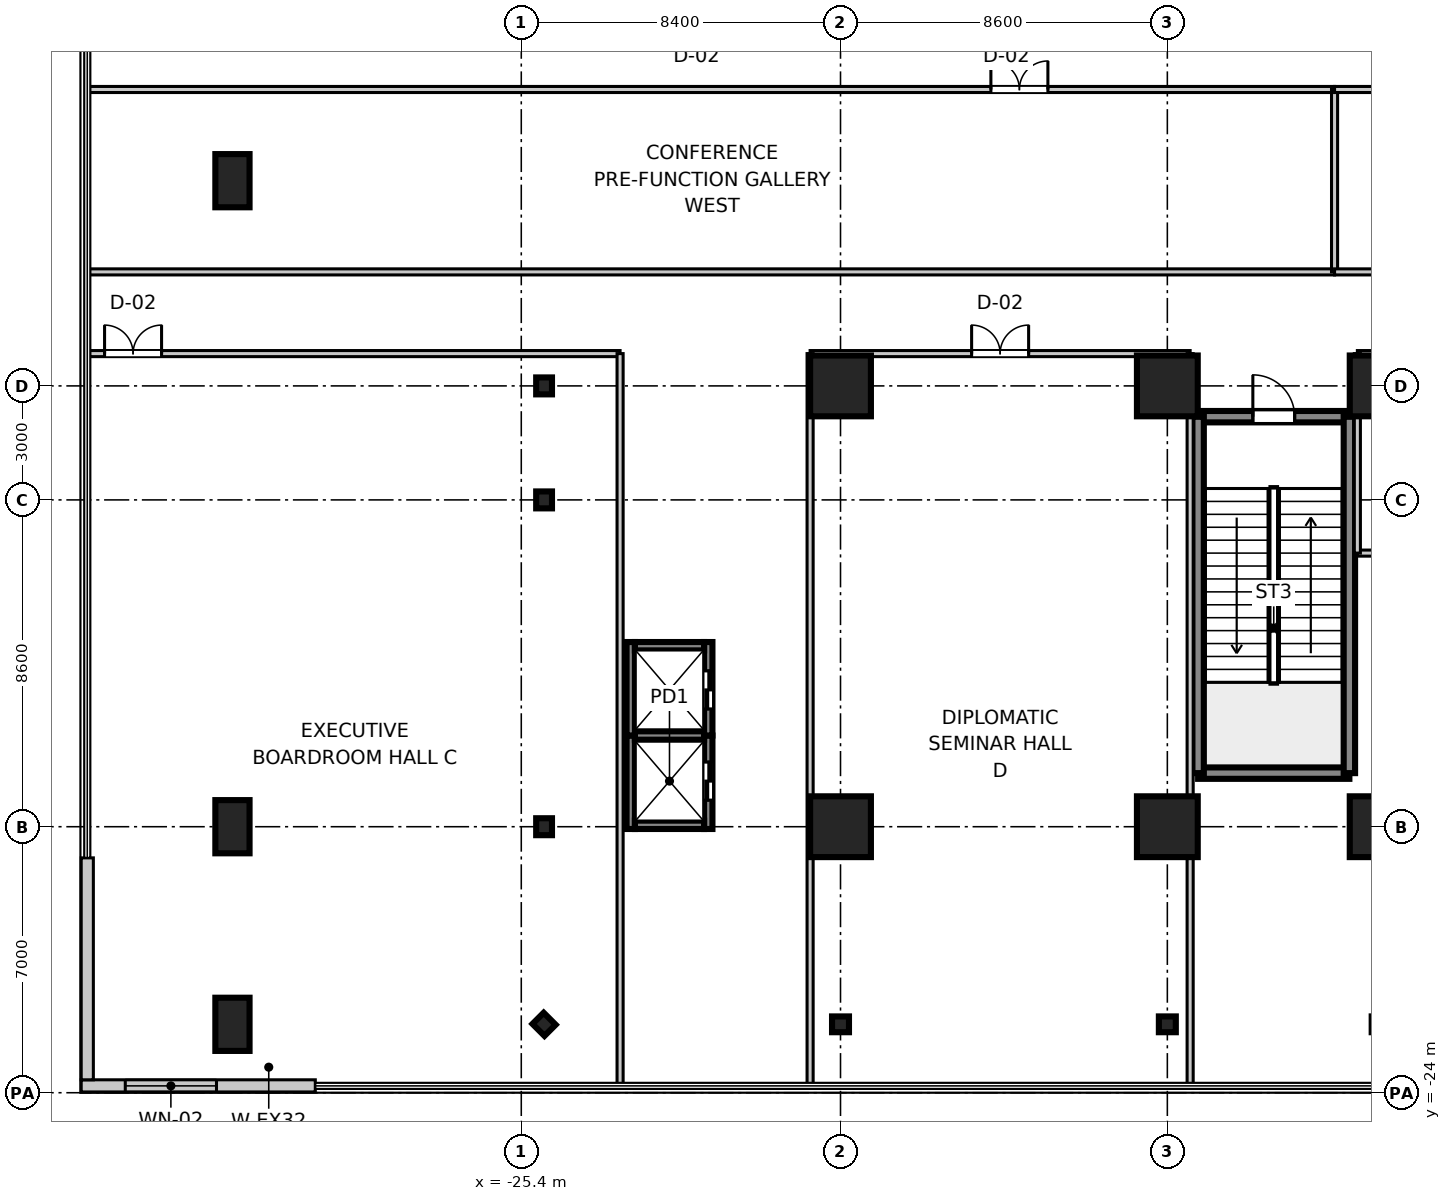
"""IFC4 building model, lengths in metres.
Left out: names, types, materials, properties, quantities, classifications, styles, units other than length and angle.
Written with IfcOpenShell. Run it as: python <this file> out.ifc"""

import sys

from ifc_helpers import new_model, si_unit, direction, frame, frame_2d, origin, origin_2d, place, context, subcontext, project, spatial, rectangle, i_section, extrude, source, transform, mapped, element, fill, save


model = new_model("IFC4")
c1 = context("Model", 3, precision=1e-05, world=origin(), true_north=direction((0.0, 1.0)))
c2 = subcontext(c1, "Body", "Model", "MODEL_VIEW")
j1 = project(units=[si_unit("LENGTHUNIT", "METRE"), si_unit("PLANEANGLEUNIT", "RADIAN")], contexts=[c1])
p1 = place(None, origin())
s1 = spatial("IfcSite", under=j1, at=p1, CompositionType="ELEMENT")
p2 = place(p1, origin())
s2 = spatial("IfcBuilding", under=s1, at=p2, CompositionType="ELEMENT")
p3 = place(p2, frame((0.0, 0.0, 10.8)))
s3 = spatial("IfcBuildingStorey", under=s2, at=p3, CompositionType="ELEMENT", Elevation=10.8)
m1 = source(origin(), c2, "Body", "SweptSolid", [
    extrude(rectangle(XDim=1.6, YDim=1.6, at=origin_2d()), origin(), (0.0, 0.0, 1.0), 5.355),
])
for number, where, z_axis, x_axis in (
    (1, (-17.0, -17.0, 0.0), (0.0, 0.0, 1.0), (1.0, 0.0, 0.0)),
    (2, (-17.0, -5.4, 0.0), (0.0, 0.0, 1.0), (1.0, 0.0, 0.0)),
    (3, (-8.4, -17.0, 0.0), (0.0, 0.0, 1.0), (1.0, 0.0, 0.0)),
    (4, (-8.4, -5.4, 0.0), (0.0, 0.0, 1.0), (1.0, 0.0, 0.0)),
    (5, (-2.8, -17.0, 0.0), (0.0, 0.0, 1.0), (1.0, 0.0, 0.0)),
    (6, (-2.8, -5.4, 0.0), (0.0, 0.0, 1.0), (1.0, 0.0, 0.0)),
):
    element("IfcColumn", number, at=place(p3, frame(where, z_axis=z_axis, x_axis=x_axis)), inside=s3, PredefinedType="COLUMN", context=c2, shape_type="MappedRepresentation", body=[
        mapped(m1, transform((0.0, 0.0, 0.0), scale=1.0)),
    ])
m2 = source(origin(), c2, "Body", "SweptSolid", [
    extrude(rectangle(XDim=0.9, YDim=1.4, at=origin_2d()), origin(), (0.0, 0.0, 1.0), 5.355),
])
for number, where, z_axis, x_axis in (
    (7, (-33.0, -22.2, 0.0), (0.0, 0.0, 1.0), (1.0, 0.0, 0.0)),
    (8, (-33.0, -17.0, 0.0), (0.0, 0.0, 1.0), (1.0, 0.0, 0.0)),
    (9, (-33.0, 0.0, 0.0), (0.0, 0.0, 1.0), (1.0, 0.0, 0.0)),
):
    element("IfcColumn", number, at=place(p3, frame(where, z_axis=z_axis, x_axis=x_axis)), inside=s3, PredefinedType="PILASTER", context=c2, shape_type="MappedRepresentation", body=[
        mapped(m2, transform((0.0, 0.0, 0.0), scale=1.0)),
    ])
m3 = source(origin(), c2, "Body", "SweptSolid", [
    extrude(i_section(OverallWidth=0.416, OverallDepth=0.446, WebThickness=0.025, FlangeThickness=0.04, at=origin_2d()), origin(), (0.0, 0.0, 1.0), 5.355),
])
for number, where, z_axis, x_axis in (
    (10, (-24.8, -17.0, 0.0), (0.0, 0.0, 1.0), (1.0, 0.0, 0.0)),
    (11, (-24.8, -8.4, 0.0), (0.0, 0.0, 1.0), (1.0, 0.0, 0.0)),
    (12, (-24.8, -5.4, 0.0), (0.0, 0.0, 1.0), (1.0, 0.0, 0.0)),
    (13, (-17.0, -22.2, 0.0), (0.0, 0.0, 1.0), (0.0, 1.0, 0.0)),
    (14, (-8.4, -22.2, 0.0), (0.0, 0.0, 1.0), (0.0, 1.0, 0.0)),
    (15, (-2.8, -22.2, 0.0), (0.0, 0.0, 1.0), (0.0, 1.0, 0.0)),
    (16, (-24.8, -22.2, 0.0), (0.0, 0.0, 1.0), (0.707, 0.707, 0.0)),
):
    element("IfcColumn", number, at=place(p3, frame(where, z_axis=z_axis, x_axis=x_axis)), inside=s3, PredefinedType="COLUMN", context=c2, shape_type="MappedRepresentation", body=[
        mapped(m3, transform((0.0, 0.0, 0.0), scale=1.0)),
    ])
m4 = source(origin(), c2, "Body", "SweptSolid", [
    extrude(rectangle(XDim=3.98, YDim=0.3, at=frame_2d((1.99, 0.0))), origin(), (0.0, 0.0, 1.0), 5.06),
])
p4 = place(p3, frame((-7.59, -15.59, 0.0), z_axis=(0.0, 0.0, 1.0), x_axis=(1.0, 0.0, 0.0)))
e17 = element("IfcWall", 17, at=p4, inside=s3, PredefinedType="SHEAR", context=c2, shape_type="MappedRepresentation", body=[
    mapped(m4, transform((0.0, 0.0, 0.0), scale=1.0)),
])
p5 = place(p3, frame((-7.59, -6.21, 0.0), z_axis=(0.0, 0.0, 1.0), x_axis=(1.0, 0.0, 0.0)))
e18 = element("IfcWall", 18, at=p5, inside=s3, PredefinedType="SHEAR", context=c2, shape_type="MappedRepresentation", body=[
    mapped(m4, transform((0.0, 0.0, 0.0), scale=1.0)),
])
p6 = place(p5, frame((1.44, 0.0, 0.0)))
e19 = element("IfcOpeningElement", 19, at=p6, cuts=e18, PredefinedType="OPENING", context=c2, shape_type="SweptSolid", body=[
    extrude(rectangle(XDim=1.1, YDim=2.15, at=frame_2d((0.55, 1.075))), frame((0.0, 0.16, 0.0), z_axis=(0.0, -1.0, 0.0), x_axis=(1.0, 0.0, 0.0)), (0.0, 0.0, 1.0), 0.32),
])
m5 = source(origin(), c2, "Body", "SweptSolid", [
    extrude(rectangle(XDim=9.38, YDim=0.3, at=frame_2d((4.69, 0.0))), origin(), (0.0, 0.0, 1.0), 5.06),
])
for number, where, z_axis, x_axis in (
    (20, (-7.59, -15.59, 0.0), (0.0, 0.0, 1.0), (0.0, 1.0, 0.0)),
    (21, (-3.61, -15.59, 0.0), (0.0, 0.0, 1.0), (0.0, 1.0, 0.0)),
):
    element("IfcWall", number, at=place(p3, frame(where, z_axis=z_axis, x_axis=x_axis)), inside=s3, PredefinedType="SHEAR", context=c2, shape_type="MappedRepresentation", body=[
        mapped(m5, transform((0.0, 0.0, 0.0), scale=1.0)),
    ])
m6 = source(origin(), c2, "Body", "SweptSolid", [
    extrude(rectangle(XDim=2.46, YDim=0.22, at=frame_2d((1.23, 0.0))), origin(), (0.0, 0.0, 1.0), 5.06),
])
p7 = place(p3, frame((-22.52, -17.06, 0.0), z_axis=(0.0, 0.0, 1.0), x_axis=(0.0, 1.0, 0.0)))
e22 = element("IfcWall", 22, at=p7, inside=s3, PredefinedType="SHEAR", context=c2, shape_type="MappedRepresentation", body=[
    mapped(m6, transform((0.0, 0.0, 0.0), scale=1.0)),
])
p8 = place(p3, frame((-20.48, -17.06, 0.0), z_axis=(0.0, 0.0, 1.0), x_axis=(0.0, 1.0, 0.0)))
e23 = element("IfcWall", 23, at=p8, inside=s3, PredefinedType="SHEAR", context=c2, shape_type="MappedRepresentation", body=[
    mapped(m6, transform((0.0, 0.0, 0.0), scale=1.0)),
])
p9 = place(p8, frame((0.76, 0.0, 0.0)))
e24 = element("IfcOpeningElement", 24, at=p9, cuts=e23, PredefinedType="OPENING", context=c2, shape_type="SweptSolid", body=[
    extrude(rectangle(XDim=1.0, YDim=2.2, at=frame_2d((0.5, 1.1))), frame((0.0, 0.12, 0.0), z_axis=(0.0, -1.0, 0.0), x_axis=(1.0, 0.0, 0.0)), (0.0, 0.0, 1.0), 0.24),
])
m7 = source(origin(), c2, "Body", "SweptSolid", [
    extrude(rectangle(XDim=1.82, YDim=0.22, at=frame_2d((0.91, 0.0))), origin(), (0.0, 0.0, 1.0), 5.06),
])
p10 = place(p3, frame((-22.41, -16.95, 0.0), z_axis=(0.0, 0.0, 1.0), x_axis=(1.0, 0.0, 0.0)))
e25 = element("IfcWall", 25, at=p10, inside=s3, PredefinedType="SHEAR", context=c2, shape_type="MappedRepresentation", body=[
    mapped(m7, transform((0.0, 0.0, 0.0), scale=1.0)),
])
m8 = source(origin(), c2, "Body", "SweptSolid", [
    extrude(rectangle(XDim=1.82, YDim=0.22, at=frame_2d((0.91, 0.0))), origin(), (0.0, 0.0, 1.0), 5.4),
])
p11 = place(p3, frame((-22.41, -14.6, 0.0), z_axis=(0.0, 0.0, 1.0), x_axis=(1.0, 0.0, 0.0)))
e26 = element("IfcWall", 26, at=p11, inside=s3, PredefinedType="SHEAR", context=c2, shape_type="MappedRepresentation", body=[
    mapped(m8, transform((0.0, 0.0, 0.0), scale=1.0)),
])
m9 = source(origin(), c2, "Body", "SweptSolid", [
    extrude(rectangle(XDim=2.46, YDim=0.22, at=frame_2d((1.23, 0.0))), origin(), (0.0, 0.0, 1.0), 5.06),
])
p12 = place(p3, frame((-22.52, -14.6, 0.0), z_axis=(0.0, 0.0, 1.0), x_axis=(0.0, 1.0, 0.0)))
e27 = element("IfcWall", 27, at=p12, inside=s3, PredefinedType="SHEAR", context=c2, shape_type="MappedRepresentation", body=[
    mapped(m9, transform((0.0, 0.0, 0.0), scale=1.0)),
])
p13 = place(p3, frame((-20.48, -14.6, 0.0), z_axis=(0.0, 0.0, 1.0), x_axis=(0.0, 1.0, 0.0)))
e28 = element("IfcWall", 28, at=p13, inside=s3, PredefinedType="SHEAR", context=c2, shape_type="MappedRepresentation", body=[
    mapped(m9, transform((0.0, 0.0, 0.0), scale=1.0)),
])
p14 = place(p13, frame((0.7, 0.0, 0.0)))
e29 = element("IfcOpeningElement", 29, at=p14, cuts=e28, PredefinedType="OPENING", context=c2, shape_type="SweptSolid", body=[
    extrude(rectangle(XDim=1.0, YDim=2.2, at=frame_2d((0.5, 1.1))), frame((0.0, 0.12, 0.0), z_axis=(0.0, -1.0, 0.0), x_axis=(1.0, 0.0, 0.0)), (0.0, 0.0, 1.0), 0.24),
])
p15 = place(p3, frame((-22.41, -12.25, 0.0), z_axis=(0.0, 0.0, 1.0), x_axis=(1.0, 0.0, 0.0)))
e30 = element("IfcWall", 30, at=p15, inside=s3, PredefinedType="SHEAR", context=c2, shape_type="MappedRepresentation", body=[
    mapped(m7, transform((0.0, 0.0, 0.0), scale=1.0)),
])
m10 = source(origin(), c2, "Body", "SweptSolid", [
    extrude(rectangle(XDim=6.16, YDim=0.32, at=frame_2d((3.08, 0.0))), origin(), (0.0, 0.0, 1.0), 5.06),
])
p16 = place(p3, frame((-36.98, -23.82, 0.0), z_axis=(0.0, 0.0, 1.0), x_axis=(1.0, 0.0, 0.0)))
e31 = element("IfcWall", 31, at=p16, inside=s3, PredefinedType="STANDARD", context=c2, shape_type="MappedRepresentation", body=[
    mapped(m10, transform((0.0, 0.0, 0.0), scale=1.0)),
])
p17 = place(p16, frame((1.16, 0.0, 0.9)))
e32 = element("IfcOpeningElement", 32, at=p17, cuts=e31, PredefinedType="OPENING", context=c2, shape_type="SweptSolid", body=[
    extrude(rectangle(XDim=2.4, YDim=2.2, at=frame_2d((1.2, 1.1))), frame((0.0, 0.17, 0.0), z_axis=(0.0, -1.0, 0.0), x_axis=(1.0, 0.0, 0.0)), (0.0, 0.0, 1.0), 0.34),
])
m11 = source(origin(), c2, "Body", "SweptSolid", [
    extrude(rectangle(XDim=5.84, YDim=0.32, at=frame_2d((2.92, 0.0))), origin(), (0.0, 0.0, 1.0), 5.06),
])
p18 = place(p3, frame((-36.82, -23.66, 0.0), z_axis=(0.0, 0.0, 1.0), x_axis=(0.0, 1.0, 0.0)))
e33 = element("IfcWall", 33, at=p18, inside=s3, PredefinedType="STANDARD", context=c2, shape_type="MappedRepresentation", body=[
    mapped(m11, transform((0.0, 0.0, 0.0), scale=1.0)),
])
m12 = source(origin(), c2, "Body", "SweptSolid", [
    extrude(rectangle(XDim=13.96, YDim=0.16, at=frame_2d((6.98, 0.0))), origin(), (0.0, 0.0, 1.0), 3.4),
])
p19 = place(p3, frame((-36.76, -4.55, 0.0), z_axis=(0.0, 0.0, 1.0), x_axis=(1.0, 0.0, 0.0)))
e34 = element("IfcWall", 34, at=p19, inside=s3, PredefinedType="PARTITIONING", context=c2, shape_type="MappedRepresentation", body=[
    mapped(m12, transform((0.0, 0.0, 0.0), scale=1.0)),
])
p20 = place(p19, frame((0.395, 0.0, 0.0)))
e35 = element("IfcOpeningElement", 35, at=p20, cuts=e34, PredefinedType="OPENING", context=c2, shape_type="SweptSolid", body=[
    extrude(rectangle(XDim=1.5, YDim=2.15, at=frame_2d((0.75, 1.075))), frame((0.0, 0.09, 0.0), z_axis=(0.0, -1.0, 0.0), x_axis=(1.0, 0.0, 0.0)), (0.0, 0.0, 1.0), 0.18),
])
m13 = source(origin(), c2, "Body", "SweptSolid", [
    extrude(rectangle(XDim=19.21, YDim=0.16, at=frame_2d((9.605, 0.0))), origin(), (0.0, 0.0, 1.0), 3.4),
])
p21 = place(p3, frame((-22.8, -23.76, 0.0), z_axis=(0.0, 0.0, 1.0), x_axis=(0.0, 1.0, 0.0)))
e36 = element("IfcWall", 36, at=p21, inside=s3, PredefinedType="PARTITIONING", context=c2, shape_type="MappedRepresentation", body=[
    mapped(m13, transform((0.0, 0.0, 0.0), scale=1.0)),
])
m14 = source(origin(), c2, "Body", "SweptSolid", [
    extrude(rectangle(XDim=10.0, YDim=0.16, at=frame_2d((5.0, 0.0))), origin(), (0.0, 0.0, 1.0), 3.4),
])
p22 = place(p3, frame((-17.8, -4.55, 0.0), z_axis=(0.0, 0.0, 1.0), x_axis=(1.0, 0.0, 0.0)))
e37 = element("IfcWall", 37, at=p22, inside=s3, PredefinedType="PARTITIONING", context=c2, shape_type="MappedRepresentation", body=[
    mapped(m14, transform((0.0, 0.0, 0.0), scale=1.0)),
])
p23 = place(p22, frame((4.25, 0.0, 0.0)))
e38 = element("IfcOpeningElement", 38, at=p23, cuts=e37, PredefinedType="OPENING", context=c2, shape_type="SweptSolid", body=[
    extrude(rectangle(XDim=1.5, YDim=2.15, at=frame_2d((0.75, 1.075))), frame((0.0, 0.09, 0.0), z_axis=(0.0, -1.0, 0.0), x_axis=(1.0, 0.0, 0.0)), (0.0, 0.0, 1.0), 0.18),
])
for number, where, z_axis, x_axis in (
    (39, (-17.8, -23.76, 0.0), (0.0, 0.0, 1.0), (0.0, 1.0, 0.0)),
    (40, (-7.8, -23.76, 0.0), (0.0, 0.0, 1.0), (0.0, 1.0, 0.0)),
):
    element("IfcWall", number, at=place(p3, frame(where, z_axis=z_axis, x_axis=x_axis)), inside=s3, PredefinedType="PARTITIONING", context=c2, shape_type="MappedRepresentation", body=[
        mapped(m13, transform((0.0, 0.0, 0.0), scale=1.0)),
    ])
m15 = source(origin(), c2, "Body", "SweptSolid", [
    extrude(rectangle(XDim=32.76, YDim=0.16, at=frame_2d((16.38, 0.0))), origin(), (0.0, 0.0, 1.0), 3.4),
])
p24 = place(p3, frame((-36.76, -2.4, 0.0), z_axis=(0.0, 0.0, 1.0), x_axis=(1.0, 0.0, 0.0)))
e41 = element("IfcWall", 41, at=p24, inside=s3, PredefinedType="PARTITIONING", context=c2, shape_type="MappedRepresentation", body=[
    mapped(m15, transform((0.0, 0.0, 0.0), scale=1.0)),
])
p25 = place(p3, frame((-36.76, 2.4, 0.0), z_axis=(0.0, 0.0, 1.0), x_axis=(1.0, 0.0, 0.0)))
e42 = element("IfcWall", 42, at=p25, inside=s3, PredefinedType="PARTITIONING", context=c2, shape_type="MappedRepresentation", body=[
    mapped(m15, transform((0.0, 0.0, 0.0), scale=1.0)),
])
p26 = place(p25, frame((23.717, 0.0, 0.0)))
e43 = element("IfcOpeningElement", 43, at=p26, cuts=e42, PredefinedType="OPENING", context=c2, shape_type="SweptSolid", body=[
    extrude(rectangle(XDim=1.5, YDim=2.15, at=frame_2d((0.75, 1.075))), frame((0.0, 0.09, 0.0), z_axis=(0.0, -1.0, 0.0), x_axis=(1.0, 0.0, 0.0)), (0.0, 0.0, 1.0), 0.18),
])
m16 = source(origin(), c2, "Body", "SweptSolid", [
    extrude(rectangle(XDim=4.8, YDim=0.16, at=frame_2d((2.4, 0.0))), origin(), (0.0, 0.0, 1.0), 3.4),
])
p27 = place(p3, frame((-4.0, -2.4, 0.0), z_axis=(0.0, 0.0, 1.0), x_axis=(0.0, 1.0, 0.0)))
e44 = element("IfcWall", 44, at=p27, inside=s3, PredefinedType="PARTITIONING", context=c2, shape_type="MappedRepresentation", body=[
    mapped(m16, transform((0.0, 0.0, 0.0), scale=1.0)),
])
m17 = source(origin(), c2, "Body", "SweptSolid", [
    extrude(rectangle(XDim=12.2, YDim=0.16, at=frame_2d((6.1, 0.0))), origin(), (0.0, 0.0, 1.0), 3.4),
])
p28 = place(p3, frame((-4.0, -2.4, 0.0), z_axis=(0.0, 0.0, 1.0), x_axis=(1.0, 0.0, 0.0)))
e45 = element("IfcWall", 45, at=p28, inside=s3, PredefinedType="PARTITIONING", context=c2, shape_type="MappedRepresentation", body=[
    mapped(m17, transform((0.0, 0.0, 0.0), scale=1.0)),
])
p29 = place(p3, frame((-4.0, 2.4, 0.0), z_axis=(0.0, 0.0, 1.0), x_axis=(1.0, 0.0, 0.0)))
e46 = element("IfcWall", 46, at=p29, inside=s3, PredefinedType="PARTITIONING", context=c2, shape_type="MappedRepresentation", body=[
    mapped(m17, transform((0.0, 0.0, 0.0), scale=1.0)),
])
p30 = place(p29, frame((8.981, 0.0, 0.0)))
e47 = element("IfcOpeningElement", 47, at=p30, cuts=e46, PredefinedType="OPENING", context=c2, shape_type="SweptSolid", body=[
    extrude(rectangle(XDim=1.5, YDim=2.15, at=frame_2d((0.75, 1.075))), frame((0.0, 0.09, 0.0), z_axis=(0.0, -1.0, 0.0), x_axis=(1.0, 0.0, 0.0)), (0.0, 0.0, 1.0), 0.18),
])
m18 = source(origin(), c2, "Body", "SweptSolid", [
    extrude(rectangle(XDim=5.6, YDim=0.16, at=frame_2d((2.8, 0.0))), origin(), (0.0, 0.0, 1.0), 3.4),
])
p31 = place(p3, frame((-3.4, -9.8, 0.0), z_axis=(0.0, 0.0, 1.0), x_axis=(1.0, 0.0, 0.0)))
e48 = element("IfcWall", 48, at=p31, inside=s3, PredefinedType="PARTITIONING", context=c2, shape_type="MappedRepresentation", body=[
    mapped(m18, transform((0.0, 0.0, 0.0), scale=1.0)),
])
p32 = place(p3, frame((-3.4, -4.55, 0.0), z_axis=(0.0, 0.0, 1.0), x_axis=(1.0, 0.0, 0.0)))
e49 = element("IfcWall", 49, at=p32, inside=s3, PredefinedType="PARTITIONING", context=c2, shape_type="MappedRepresentation", body=[
    mapped(m18, transform((0.0, 0.0, 0.0), scale=1.0)),
])
p33 = place(p32, frame((2.978, 0.0, 0.0)))
e50 = element("IfcOpeningElement", 50, at=p33, cuts=e49, PredefinedType="OPENING", context=c2, shape_type="SweptSolid", body=[
    extrude(rectangle(XDim=0.98, YDim=2.1, at=frame_2d((0.49, 1.05))), frame((0.0, 0.09, 0.0), z_axis=(0.0, -1.0, 0.0), x_axis=(1.0, 0.0, 0.0)), (0.0, 0.0, 1.0), 0.18),
])
m19 = source(origin(), c2, "Body", "SweptSolid", [
    extrude(rectangle(XDim=5.25, YDim=0.16, at=frame_2d((2.625, 0.0))), origin(), (0.0, 0.0, 1.0), 3.4),
])
p34 = place(p3, frame((-3.4, -9.8, 0.0), z_axis=(0.0, 0.0, 1.0), x_axis=(0.0, 1.0, 0.0)))
e51 = element("IfcWall", 51, at=p34, inside=s3, PredefinedType="PARTITIONING", context=c2, shape_type="MappedRepresentation", body=[
    mapped(m19, transform((0.0, 0.0, 0.0), scale=1.0)),
])
m20 = source(origin(), c2, "Body", "SweptSolid", [
    extrude(rectangle(XDim=1.1, YDim=2.15, at=frame_2d((0.55, 1.075))), frame((0.0, 0.025, 0.0), z_axis=(0.0, -1.0, 0.0), x_axis=(1.0, 0.0, 0.0)), (0.0, 0.0, 1.0), 0.05),
])
p35 = place(p6, frame((1.1, 0.0, 0.0), z_axis=(0.0, 0.0, 1.0), x_axis=(-1.0, 0.0, 0.0)))
e52 = element("IfcDoor", 52, at=p35, inside=s3, OperationType="SINGLE_SWING_LEFT", PredefinedType="DOOR", context=c2, shape_type="MappedRepresentation", body=[
    mapped(m20, transform((0.0, 0.0, 0.0), scale=1.0)),
])
fill(e19, e52)
m21 = source(origin(), c2, "Body", "SweptSolid", [
    extrude(rectangle(XDim=1.0, YDim=2.2, at=frame_2d((0.5, 1.1))), frame((0.0, 0.025, 0.0), z_axis=(0.0, -1.0, 0.0), x_axis=(1.0, 0.0, 0.0)), (0.0, 0.0, 1.0), 0.05),
])
p36 = place(p9, frame((1.0, 0.0, 0.0), z_axis=(0.0, 0.0, 1.0), x_axis=(-1.0, 0.0, 0.0)))
e53 = element("IfcDoor", 53, at=p36, inside=s3, OperationType="DOUBLE_DOOR_SLIDING", PredefinedType="DOOR", context=c2, shape_type="MappedRepresentation", body=[
    mapped(m21, transform((0.0, 0.0, 0.0), scale=1.0)),
])
fill(e24, e53)
p37 = place(p14, frame((1.0, 0.0, 0.0), z_axis=(0.0, 0.0, 1.0), x_axis=(-1.0, 0.0, 0.0)))
e54 = element("IfcDoor", 54, at=p37, inside=s3, OperationType="DOUBLE_DOOR_SLIDING", PredefinedType="DOOR", context=c2, shape_type="MappedRepresentation", body=[
    mapped(m21, transform((0.0, 0.0, 0.0), scale=1.0)),
])
fill(e29, e54)
m22 = source(origin(), c2, "Body", "SweptSolid", [
    extrude(rectangle(XDim=2.4, YDim=2.2, at=frame_2d((1.2, 1.1))), frame((0.0, 0.03, 0.0), z_axis=(0.0, -1.0, 0.0), x_axis=(1.0, 0.0, 0.0)), (0.0, 0.0, 1.0), 0.06),
])
p38 = place(p17, origin())
e55 = element("IfcWindow", 55, at=p38, inside=s3, PartitioningType="SINGLE_PANEL", PredefinedType="WINDOW", context=c2, shape_type="MappedRepresentation", body=[
    mapped(m22, transform((0.0, 0.0, 0.0), scale=1.0)),
])
fill(e32, e55)
m23 = source(origin(), c2, "Body", "SweptSolid", [
    extrude(rectangle(XDim=1.5, YDim=2.15, at=frame_2d((0.75, 1.075))), frame((0.0, 0.025, 0.0), z_axis=(0.0, -1.0, 0.0), x_axis=(1.0, 0.0, 0.0)), (0.0, 0.0, 1.0), 0.05),
])
p39 = place(p20, frame((1.5, 0.0, 0.0), z_axis=(0.0, 0.0, 1.0), x_axis=(-1.0, 0.0, 0.0)))
e56 = element("IfcDoor", 56, at=p39, inside=s3, OperationType="DOUBLE_DOOR_SINGLE_SWING", PredefinedType="DOOR", context=c2, shape_type="MappedRepresentation", body=[
    mapped(m23, transform((0.0, 0.0, 0.0), scale=1.0)),
])
fill(e35, e56)
p40 = place(p23, frame((1.5, 0.0, 0.0), z_axis=(0.0, 0.0, 1.0), x_axis=(-1.0, 0.0, 0.0)))
e57 = element("IfcDoor", 57, at=p40, inside=s3, OperationType="DOUBLE_DOOR_SINGLE_SWING", PredefinedType="DOOR", context=c2, shape_type="MappedRepresentation", body=[
    mapped(m23, transform((0.0, 0.0, 0.0), scale=1.0)),
])
fill(e38, e57)
p41 = place(p26, frame((1.5, 0.0, 0.0), z_axis=(0.0, 0.0, 1.0), x_axis=(-1.0, 0.0, 0.0)))
e58 = element("IfcDoor", 58, at=p41, inside=s3, OperationType="DOUBLE_DOOR_SINGLE_SWING", PredefinedType="DOOR", context=c2, shape_type="MappedRepresentation", body=[
    mapped(m23, transform((0.0, 0.0, 0.0), scale=1.0)),
])
fill(e43, e58)
save(model, sys.argv[1])
